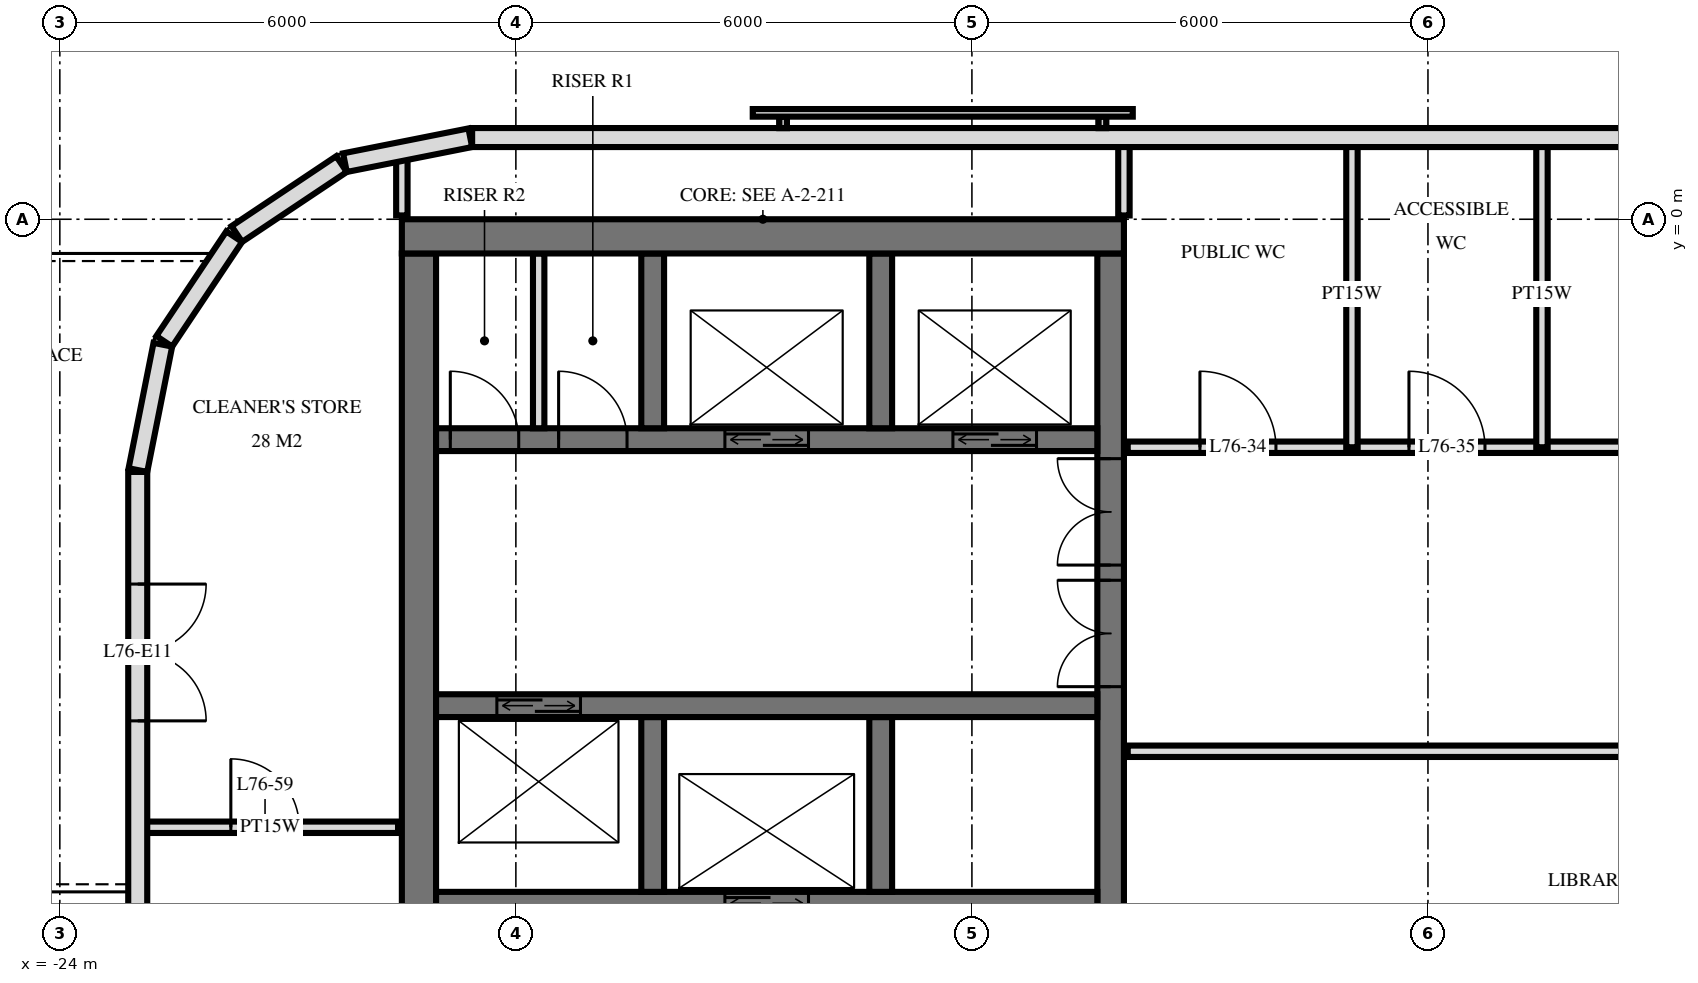
"""IFC4 building model, lengths in metres.
Left out: names, types, materials, properties, quantities, classifications, styles, units other than length and angle.
Written with IfcOpenShell. Run it as: python <this file> out.ifc"""

import sys

from ifc_helpers import new_model, si_unit, direction, frame, frame_2d, origin, place, context, subcontext, project, spatial, rectangle, extrude, element, fill, save


model = new_model("IFC4")
c1 = context("Model", 3, precision=1e-05, world=origin(), true_north=direction((0.0, 1.0)))
c2 = subcontext(c1, "Body", "Model", "MODEL_VIEW")
j1 = project(units=[si_unit("LENGTHUNIT", "METRE"), si_unit("PLANEANGLEUNIT", "RADIAN")], contexts=[c1])
p1 = place(None, origin())
s1 = spatial("IfcSite", under=j1, at=p1, CompositionType="ELEMENT")
p2 = place(p1, origin())
s2 = spatial("IfcBuilding", under=s1, at=p2, CompositionType="ELEMENT")
p3 = place(p2, frame((0.0, 0.0, 287.6)))
s3 = spatial("IfcBuildingStorey", under=s2, at=p3, CompositionType="ELEMENT", Elevation=287.6)
p4 = place(p3, frame((-19.5, -0.225, 0.0), z_axis=(0.0, 0.0, 1.0), x_axis=(1.0, 0.0, 0.0)))
e1 = element("IfcWall", 1, at=p4, inside=s3, PredefinedType="SHEAR", context=c2, shape_type="SweptSolid", body=[
    extrude(rectangle(XDim=9.5, YDim=0.45, at=frame_2d((4.75, 0.0))), origin(), (0.0, 0.0, 1.0), 3.5),
])
p5 = place(p3, frame((-10.175, -14.55, 0.0), z_axis=(0.0, 0.0, 1.0), x_axis=(0.0, 1.0, 0.0)))
e2 = element("IfcWall", 2, at=p5, inside=s3, PredefinedType="SHEAR", context=c2, shape_type="SweptSolid", body=[
    extrude(rectangle(XDim=14.1, YDim=0.35, at=frame_2d((7.05, 0.0))), origin(), (0.0, 0.0, 1.0), 3.5),
])
p6 = place(p5, frame((8.4, 0.0, 0.0)))
e3 = element("IfcOpeningElement", 3, at=p6, cuts=e2, PredefinedType="OPENING", context=c2, shape_type="SweptSolid", body=[
    extrude(rectangle(XDim=1.4, YDim=2.4, at=frame_2d((0.7, 1.2))), frame((0.0, 0.185, 0.0), z_axis=(0.0, -1.0, 0.0), x_axis=(1.0, 0.0, 0.0)), (0.0, 0.0, 1.0), 0.37),
])
p7 = place(p5, frame((10.0, 0.0, 0.0)))
e4 = element("IfcOpeningElement", 4, at=p7, cuts=e2, PredefinedType="OPENING", context=c2, shape_type="SweptSolid", body=[
    extrude(rectangle(XDim=1.4, YDim=2.4, at=frame_2d((0.7, 1.2))), frame((0.0, 0.185, 0.0), z_axis=(0.0, -1.0, 0.0), x_axis=(1.0, 0.0, 0.0)), (0.0, 0.0, 1.0), 0.37),
])
p8 = place(p5, frame((4.0, 0.0, 0.0)))
e5 = element("IfcOpeningElement", 5, at=p8, cuts=e2, PredefinedType="OPENING", context=c2, shape_type="SweptSolid", body=[
    extrude(rectangle(XDim=1.2, YDim=2.1, at=frame_2d((0.6, 1.05))), frame((0.0, 0.185, 0.0), z_axis=(0.0, -1.0, 0.0), x_axis=(1.0, 0.0, 0.0)), (0.0, 0.0, 1.0), 0.37),
])
p9 = place(p3, frame((-19.275, -14.55, 0.0), z_axis=(0.0, 0.0, 1.0), x_axis=(0.0, 1.0, 0.0)))
e6 = element("IfcWall", 6, at=p9, inside=s3, PredefinedType="SHEAR", context=c2, shape_type="SweptSolid", body=[
    extrude(rectangle(XDim=14.1, YDim=0.45, at=frame_2d((7.05, 0.0))), origin(), (0.0, 0.0, 1.0), 3.5),
])
p10 = place(p3, frame((-19.05, -2.9, 0.0), z_axis=(0.0, 0.0, 1.0), x_axis=(1.0, 0.0, 0.0)))
e7 = element("IfcWall", 7, at=p10, inside=s3, PredefinedType="SHEAR", context=c2, shape_type="SweptSolid", body=[
    extrude(rectangle(XDim=8.7, YDim=0.3, at=frame_2d((4.35, 0.0))), origin(), (0.0, 0.0, 1.0), 3.5),
])
p11 = place(p10, frame((6.8, 0.0, 0.0)))
e8 = element("IfcOpeningElement", 8, at=p11, cuts=e7, PredefinedType="OPENING", context=c2, shape_type="SweptSolid", body=[
    extrude(rectangle(XDim=1.1, YDim=2.1, at=frame_2d((0.55, 1.05))), frame((0.0, 0.16, 0.0), z_axis=(0.0, -1.0, 0.0), x_axis=(1.0, 0.0, 0.0)), (0.0, 0.0, 1.0), 0.32),
])
p12 = place(p10, frame((3.8, 0.0, 0.0)))
e9 = element("IfcOpeningElement", 9, at=p12, cuts=e7, PredefinedType="OPENING", context=c2, shape_type="SweptSolid", body=[
    extrude(rectangle(XDim=1.1, YDim=2.1, at=frame_2d((0.55, 1.05))), frame((0.0, 0.16, 0.0), z_axis=(0.0, -1.0, 0.0), x_axis=(1.0, 0.0, 0.0)), (0.0, 0.0, 1.0), 0.32),
])
p13 = place(p10, frame((1.613, 0.0, 0.0)))
e10 = element("IfcOpeningElement", 10, at=p13, cuts=e7, PredefinedType="OPENING", context=c2, shape_type="SweptSolid", body=[
    extrude(rectangle(XDim=0.9, YDim=2.1, at=frame_2d((0.45, 1.05))), frame((0.0, 0.16, 0.0), z_axis=(0.0, -1.0, 0.0), x_axis=(1.0, 0.0, 0.0)), (0.0, 0.0, 1.0), 0.32),
])
p14 = place(p10, frame((0.188, 0.0, 0.0)))
e11 = element("IfcOpeningElement", 11, at=p14, cuts=e7, PredefinedType="OPENING", context=c2, shape_type="SweptSolid", body=[
    extrude(rectangle(XDim=0.9, YDim=2.1, at=frame_2d((0.45, 1.05))), frame((0.0, 0.16, 0.0), z_axis=(0.0, -1.0, 0.0), x_axis=(1.0, 0.0, 0.0)), (0.0, 0.0, 1.0), 0.32),
])
p15 = place(p3, frame((-19.05, -6.4, 0.0), z_axis=(0.0, 0.0, 1.0), x_axis=(1.0, 0.0, 0.0)))
e12 = element("IfcWall", 12, at=p15, inside=s3, PredefinedType="SHEAR", context=c2, shape_type="SweptSolid", body=[
    extrude(rectangle(XDim=8.7, YDim=0.3, at=frame_2d((4.35, 0.0))), origin(), (0.0, 0.0, 1.0), 3.5),
])
p16 = place(p15, frame((0.8, 0.0, 0.0)))
e13 = element("IfcOpeningElement", 13, at=p16, cuts=e12, PredefinedType="OPENING", context=c2, shape_type="SweptSolid", body=[
    extrude(rectangle(XDim=1.1, YDim=2.1, at=frame_2d((0.55, 1.05))), frame((0.0, 0.16, 0.0), z_axis=(0.0, -1.0, 0.0), x_axis=(1.0, 0.0, 0.0)), (0.0, 0.0, 1.0), 0.32),
])
p17 = place(p3, frame((-19.05, -9.0, 0.0), z_axis=(0.0, 0.0, 1.0), x_axis=(1.0, 0.0, 0.0)))
e14 = element("IfcWall", 14, at=p17, inside=s3, PredefinedType="SHEAR", context=c2, shape_type="SweptSolid", body=[
    extrude(rectangle(XDim=8.7, YDim=0.3, at=frame_2d((4.35, 0.0))), origin(), (0.0, 0.0, 1.0), 3.5),
])
p18 = place(p17, frame((3.8, 0.0, 0.0)))
e15 = element("IfcOpeningElement", 15, at=p18, cuts=e14, PredefinedType="OPENING", context=c2, shape_type="SweptSolid", body=[
    extrude(rectangle(XDim=1.1, YDim=2.1, at=frame_2d((0.55, 1.05))), frame((0.0, 0.16, 0.0), z_axis=(0.0, -1.0, 0.0), x_axis=(1.0, 0.0, 0.0)), (0.0, 0.0, 1.0), 0.32),
])
for number, where, z_axis, x_axis in (
    (16, (-13.2, -2.75, 0.0), (0.0, 0.0, 1.0), (0.0, 1.0, 0.0)),
    (17, (-13.2, -8.85, 0.0), (0.0, 0.0, 1.0), (0.0, 1.0, 0.0)),
    (18, (-16.2, -2.75, 0.0), (0.0, 0.0, 1.0), (0.0, 1.0, 0.0)),
    (19, (-16.2, -8.85, 0.0), (0.0, 0.0, 1.0), (0.0, 1.0, 0.0)),
):
    element("IfcWall", number, at=place(p3, frame(where, z_axis=z_axis, x_axis=x_axis)), inside=s3, PredefinedType="SHEAR", context=c2, shape_type="SweptSolid", body=[
        extrude(rectangle(XDim=2.3, YDim=0.3, at=frame_2d((1.15, 0.0))), origin(), (0.0, 0.0, 1.0), 3.5),
    ])
p19 = place(p3, frame((18.575, 1.075, 0.0), z_axis=(0.0, 0.0, 1.0), x_axis=(-1.0, 0.0, 0.0)))
e20 = element("IfcWall", 20, at=p19, inside=s3, PredefinedType="SOLIDWALL", context=c2, shape_type="SweptSolid", body=[
    extrude(rectangle(XDim=37.151, YDim=0.25, at=frame_2d((18.575, 0.0))), origin(), (0.0, 0.0, 1.0), 3.22),
])
p20 = place(p19, frame((9.275, 0.0, 0.9)))
e21 = element("IfcOpeningElement", 21, at=p20, cuts=e20, PredefinedType="OPENING", context=c2, shape_type="SweptSolid", body=[
    extrude(rectangle(XDim=2.4, YDim=1.5, at=frame_2d((1.2, 0.75))), frame((0.0, 0.135, 0.0), z_axis=(0.0, -1.0, 0.0), x_axis=(1.0, 0.0, 0.0)), (0.0, 0.0, 1.0), 0.27),
])
p21 = place(p19, frame((12.275, 0.0, 0.9)))
e22 = element("IfcOpeningElement", 22, at=p21, cuts=e20, PredefinedType="OPENING", context=c2, shape_type="SweptSolid", body=[
    extrude(rectangle(XDim=2.4, YDim=1.5, at=frame_2d((1.2, 0.75))), frame((0.0, 0.135, 0.0), z_axis=(0.0, -1.0, 0.0), x_axis=(1.0, 0.0, 0.0)), (0.0, 0.0, 1.0), 0.27),
])
p22 = place(p19, frame((18.275, 0.0, 0.9)))
e23 = element("IfcOpeningElement", 23, at=p22, cuts=e20, PredefinedType="OPENING", context=c2, shape_type="SweptSolid", body=[
    extrude(rectangle(XDim=2.4, YDim=1.5, at=frame_2d((1.2, 0.75))), frame((0.0, 0.135, 0.0), z_axis=(0.0, -1.0, 0.0), x_axis=(1.0, 0.0, 0.0)), (0.0, 0.0, 1.0), 0.27),
])
p23 = place(p3, frame((-18.6, 1.073, 0.0), z_axis=(0.0, 0.0, 1.0), x_axis=(-0.980797896849, -0.195026884138, 0.0)))
e24 = element("IfcWall", 24, at=p23, inside=s3, PredefinedType="SOLIDWALL", context=c2, shape_type="SweptSolid", body=[
    extrude(rectangle(XDim=1.681, YDim=0.25, at=frame_2d((0.841, 0.0))), origin(), (0.0, 0.0, 1.0), 3.22),
])
for number, where, z_axis, x_axis in (
    (25, (-20.294, 0.726, 0.0), (0.0, 0.0, 1.0), (-0.831, -0.556, 0.0)),
    (26, (-21.706, -0.229, 0.0), (0.0, 0.0, 1.0), (-0.556, -0.831, 0.0)),
):
    element("IfcWall", number, at=place(p3, frame(where, z_axis=z_axis, x_axis=x_axis)), inside=s3, PredefinedType="SOLIDWALL", context=c2, shape_type="SweptSolid", body=[
        extrude(rectangle(XDim=1.656, YDim=0.25, at=frame_2d((0.828, 0.0))), origin(), (0.0, 0.0, 1.0), 3.22),
    ])
p24 = place(p3, frame((-22.645, -1.651, 0.0), z_axis=(0.0, 0.0, 1.0), x_axis=(-0.19513878023, -0.980775640221, 0.0)))
e27 = element("IfcWall", 27, at=p24, inside=s3, PredefinedType="SOLIDWALL", context=c2, shape_type="SweptSolid", body=[
    extrude(rectangle(XDim=1.681, YDim=0.25, at=frame_2d((0.841, 0.0))), origin(), (0.0, 0.0, 1.0), 3.22),
])
p25 = place(p3, frame((-22.975, -3.325, 0.0), z_axis=(0.0, 0.0, 1.0), x_axis=(0.0, -1.0, 0.0)))
e28 = element("IfcWall", 28, at=p25, inside=s3, PredefinedType="SOLIDWALL", context=c2, shape_type="SweptSolid", body=[
    extrude(rectangle(XDim=25.951, YDim=0.25, at=frame_2d((12.975, 0.0))), origin(), (0.0, 0.0, 1.0), 3.22),
])
p26 = place(p25, frame((1.475, 0.0, 0.0)))
e29 = element("IfcOpeningElement", 29, at=p26, cuts=e28, PredefinedType="OPENING", context=c2, shape_type="SweptSolid", body=[
    extrude(rectangle(XDim=1.8, YDim=2.4, at=frame_2d((0.9, 1.2))), frame((0.0, 0.135, 0.0), z_axis=(0.0, -1.0, 0.0), x_axis=(1.0, 0.0, 0.0)), (0.0, 0.0, 1.0), 0.27),
])
p27 = place(p25, frame((7.975, 0.0, 0.0)))
e30 = element("IfcOpeningElement", 30, at=p27, cuts=e28, PredefinedType="OPENING", context=c2, shape_type="SweptSolid", body=[
    extrude(rectangle(XDim=1.8, YDim=2.4, at=frame_2d((0.9, 1.2))), frame((0.0, 0.135, 0.0), z_axis=(0.0, -1.0, 0.0), x_axis=(1.0, 0.0, 0.0)), (0.0, 0.0, 1.0), 0.27),
])
p28 = place(p25, frame((18.175, 0.0, 0.0)))
e31 = element("IfcOpeningElement", 31, at=p28, cuts=e28, PredefinedType="OPENING", context=c2, shape_type="SweptSolid", body=[
    extrude(rectangle(XDim=1.8, YDim=2.4, at=frame_2d((0.9, 1.2))), frame((0.0, 0.135, 0.0), z_axis=(0.0, -1.0, 0.0), x_axis=(1.0, 0.0, 0.0)), (0.0, 0.0, 1.0), 0.27),
])
p29 = place(p25, frame((21.075, 0.0, 0.0)))
e32 = element("IfcOpeningElement", 32, at=p29, cuts=e28, PredefinedType="OPENING", context=c2, shape_type="SweptSolid", body=[
    extrude(rectangle(XDim=1.8, YDim=2.4, at=frame_2d((0.9, 1.2))), frame((0.0, 0.135, 0.0), z_axis=(0.0, -1.0, 0.0), x_axis=(1.0, 0.0, 0.0)), (0.0, 0.0, 1.0), 0.27),
])
p30 = place(p25, frame((23.825, 0.0, 0.9)))
e33 = element("IfcOpeningElement", 33, at=p30, cuts=e28, PredefinedType="OPENING", context=c2, shape_type="SweptSolid", body=[
    extrude(rectangle(XDim=1.8, YDim=1.5, at=frame_2d((0.9, 0.75))), frame((0.0, 0.135, 0.0), z_axis=(0.0, -1.0, 0.0), x_axis=(1.0, 0.0, 0.0)), (0.0, 0.0, 1.0), 0.27),
])
p31 = place(p3, frame((-17.7, -2.75, 0.0), z_axis=(0.0, 0.0, 1.0), x_axis=(0.0, 1.0, 0.0)))
e34 = element("IfcWall", 34, at=p31, inside=s3, PredefinedType="PARTITIONING", context=c2, shape_type="SweptSolid", body=[
    extrude(rectangle(XDim=2.3, YDim=0.15, at=frame_2d((1.15, 0.0))), origin(), (0.0, 0.0, 1.0), 3.2),
])
for number, where, z_axis, x_axis in (
    (35, (-4.5, -3.0, 0.0), (0.0, 0.0, 1.0), (0.0, 1.0, 0.0)),
    (36, (-7.0, -3.0, 0.0), (0.0, 0.0, 1.0), (0.0, 1.0, 0.0)),
):
    element("IfcWall", number, at=place(p3, frame(where, z_axis=z_axis, x_axis=x_axis)), inside=s3, PredefinedType="PLUMBINGWALL", context=c2, shape_type="SweptSolid", body=[
        extrude(rectangle(XDim=4.02, YDim=0.15, at=frame_2d((2.01, 0.0))), origin(), (0.0, 0.0, 1.0), 3.22),
    ])
p32 = place(p3, frame((-10.0, 0.05, 0.0), z_axis=(0.0, 0.0, 1.0), x_axis=(0.0, 1.0, 0.0)))
e37 = element("IfcWall", 37, at=p32, inside=s3, PredefinedType="PLUMBINGWALL", context=c2, shape_type="SweptSolid", body=[
    extrude(rectangle(XDim=0.97, YDim=0.15, at=frame_2d((0.485, 0.0))), origin(), (0.0, 0.0, 1.0), 3.22),
])
p33 = place(p3, frame((-19.5, 0.05, 0.0), z_axis=(0.0, 0.0, 1.0), x_axis=(0.0, 1.0, 0.0)))
e38 = element("IfcWall", 38, at=p33, inside=s3, PredefinedType="PARTITIONING", context=c2, shape_type="SweptSolid", body=[
    extrude(rectangle(XDim=0.787, YDim=0.15, at=frame_2d((0.394, 0.0))), origin(), (0.0, 0.0, 1.0), 3.22),
])
p34 = place(p3, frame((-22.92, -8.0, 0.0), z_axis=(0.0, 0.0, 1.0), x_axis=(1.0, 0.0, 0.0)))
e39 = element("IfcWall", 39, at=p34, inside=s3, PredefinedType="PLUMBINGWALL", context=c2, shape_type="SweptSolid", body=[
    extrude(rectangle(XDim=3.37, YDim=0.15, at=frame_2d((1.685, 0.0))), origin(), (0.0, 0.0, 1.0), 3.22),
])
p35 = place(p34, frame((1.17, 0.0, 0.0)))
e40 = element("IfcOpeningElement", 40, at=p35, cuts=e39, PredefinedType="OPENING", context=c2, shape_type="SweptSolid", body=[
    extrude(rectangle(XDim=0.9, YDim=2.1, at=frame_2d((0.45, 1.05))), frame((0.0, 0.085, 0.0), z_axis=(0.0, -1.0, 0.0), x_axis=(1.0, 0.0, 0.0)), (0.0, 0.0, 1.0), 0.17),
])
p36 = place(p3, frame((-9.95, -7.0, 0.0), z_axis=(0.0, 0.0, 1.0), x_axis=(1.0, 0.0, 0.0)))
e41 = element("IfcWall", 41, at=p36, inside=s3, PredefinedType="PARTITIONING", context=c2, shape_type="SweptSolid", body=[
    extrude(rectangle(XDim=19.9, YDim=0.15, at=frame_2d((9.95, 0.0))), origin(), (0.0, 0.0, 1.0), 3.22),
])
p37 = place(p36, frame((9.45, 0.0, 0.0)))
e42 = element("IfcOpeningElement", 42, at=p37, cuts=e41, PredefinedType="OPENING", context=c2, shape_type="SweptSolid", body=[
    extrude(rectangle(XDim=1.0, YDim=2.1, at=frame_2d((0.5, 1.05))), frame((0.0, 0.085, 0.0), z_axis=(0.0, -1.0, 0.0), x_axis=(1.0, 0.0, 0.0)), (0.0, 0.0, 1.0), 0.17),
])
p38 = place(p36, frame((15.45, 0.0, 0.0)))
e43 = element("IfcOpeningElement", 43, at=p38, cuts=e41, PredefinedType="OPENING", context=c2, shape_type="SweptSolid", body=[
    extrude(rectangle(XDim=1.0, YDim=2.1, at=frame_2d((0.5, 1.05))), frame((0.0, 0.085, 0.0), z_axis=(0.0, -1.0, 0.0), x_axis=(1.0, 0.0, 0.0)), (0.0, 0.0, 1.0), 0.17),
])
p39 = place(p3, frame((-9.95, -3.0, 0.0), z_axis=(0.0, 0.0, 1.0), x_axis=(1.0, 0.0, 0.0)))
e44 = element("IfcWall", 44, at=p39, inside=s3, PredefinedType="PARTITIONING", context=c2, shape_type="SweptSolid", body=[
    extrude(rectangle(XDim=19.9, YDim=0.15, at=frame_2d((9.95, 0.0))), origin(), (0.0, 0.0, 1.0), 3.22),
])
p40 = place(p39, frame((0.95, 0.0, 0.0)))
e45 = element("IfcOpeningElement", 45, at=p40, cuts=e44, PredefinedType="OPENING", context=c2, shape_type="SweptSolid", body=[
    extrude(rectangle(XDim=1.0, YDim=2.1, at=frame_2d((0.5, 1.05))), frame((0.0, 0.085, 0.0), z_axis=(0.0, -1.0, 0.0), x_axis=(1.0, 0.0, 0.0)), (0.0, 0.0, 1.0), 0.17),
])
p41 = place(p39, frame((3.7, 0.0, 0.0)))
e46 = element("IfcOpeningElement", 46, at=p41, cuts=e44, PredefinedType="OPENING", context=c2, shape_type="SweptSolid", body=[
    extrude(rectangle(XDim=1.0, YDim=2.1, at=frame_2d((0.5, 1.05))), frame((0.0, 0.085, 0.0), z_axis=(0.0, -1.0, 0.0), x_axis=(1.0, 0.0, 0.0)), (0.0, 0.0, 1.0), 0.17),
])
p42 = place(p39, frame((7.95, 0.0, 0.0)))
e47 = element("IfcOpeningElement", 47, at=p42, cuts=e44, PredefinedType="OPENING", context=c2, shape_type="SweptSolid", body=[
    extrude(rectangle(XDim=1.0, YDim=2.1, at=frame_2d((0.5, 1.05))), frame((0.0, 0.085, 0.0), z_axis=(0.0, -1.0, 0.0), x_axis=(1.0, 0.0, 0.0)), (0.0, 0.0, 1.0), 0.17),
])
p43 = place(p39, frame((15.2, 0.0, 0.0)))
e48 = element("IfcOpeningElement", 48, at=p43, cuts=e44, PredefinedType="OPENING", context=c2, shape_type="SweptSolid", body=[
    extrude(rectangle(XDim=1.0, YDim=2.1, at=frame_2d((0.5, 1.05))), frame((0.0, 0.085, 0.0), z_axis=(0.0, -1.0, 0.0), x_axis=(1.0, 0.0, 0.0)), (0.0, 0.0, 1.0), 0.17),
])
p44 = place(p26, origin())
e49 = element("IfcDoor", 49, at=p44, inside=s3, OperationType="DOUBLE_DOOR_SINGLE_SWING", PredefinedType="DOOR", context=c2, shape_type="SweptSolid", body=[
    extrude(rectangle(XDim=1.8, YDim=2.4, at=frame_2d((0.9, 1.2))), frame((0.0, 0.025, 0.0), z_axis=(0.0, -1.0, 0.0), x_axis=(1.0, 0.0, 0.0)), (0.0, 0.0, 1.0), 0.05),
])
fill(e29, e49)
p45 = place(p11, origin())
e50 = element("IfcDoor", 50, at=p45, inside=s3, OperationType="DOUBLE_DOOR_SLIDING", PredefinedType="USERDEFINED", context=c2, shape_type="SweptSolid", body=[
    extrude(rectangle(XDim=1.1, YDim=2.1, at=frame_2d((0.55, 1.05))), frame((0.0, 0.025, 0.0), z_axis=(0.0, -1.0, 0.0), x_axis=(1.0, 0.0, 0.0)), (0.0, 0.0, 1.0), 0.05),
])
fill(e8, e50)
p46 = place(p12, origin())
e51 = element("IfcDoor", 51, at=p46, inside=s3, OperationType="DOUBLE_DOOR_SLIDING", PredefinedType="USERDEFINED", context=c2, shape_type="SweptSolid", body=[
    extrude(rectangle(XDim=1.1, YDim=2.1, at=frame_2d((0.55, 1.05))), frame((0.0, 0.025, 0.0), z_axis=(0.0, -1.0, 0.0), x_axis=(1.0, 0.0, 0.0)), (0.0, 0.0, 1.0), 0.05),
])
fill(e9, e51)
p47 = place(p18, origin())
e52 = element("IfcDoor", 52, at=p47, inside=s3, OperationType="DOUBLE_DOOR_SLIDING", PredefinedType="USERDEFINED", context=c2, shape_type="SweptSolid", body=[
    extrude(rectangle(XDim=1.1, YDim=2.1, at=frame_2d((0.55, 1.05))), frame((0.0, 0.025, 0.0), z_axis=(0.0, -1.0, 0.0), x_axis=(1.0, 0.0, 0.0)), (0.0, 0.0, 1.0), 0.05),
])
fill(e15, e52)
p48 = place(p16, origin())
e53 = element("IfcDoor", 53, at=p48, inside=s3, OperationType="DOUBLE_DOOR_SLIDING", PredefinedType="USERDEFINED", context=c2, shape_type="SweptSolid", body=[
    extrude(rectangle(XDim=1.1, YDim=2.1, at=frame_2d((0.55, 1.05))), frame((0.0, 0.025, 0.0), z_axis=(0.0, -1.0, 0.0), x_axis=(1.0, 0.0, 0.0)), (0.0, 0.0, 1.0), 0.05),
])
fill(e13, e53)
p49 = place(p6, origin())
e54 = element("IfcDoor", 54, at=p49, inside=s3, OperationType="DOUBLE_DOOR_SINGLE_SWING", PredefinedType="DOOR", context=c2, shape_type="SweptSolid", body=[
    extrude(rectangle(XDim=1.4, YDim=2.4, at=frame_2d((0.7, 1.2))), frame((0.0, 0.025, 0.0), z_axis=(0.0, -1.0, 0.0), x_axis=(1.0, 0.0, 0.0)), (0.0, 0.0, 1.0), 0.05),
])
fill(e3, e54)
p50 = place(p7, origin())
e55 = element("IfcDoor", 55, at=p50, inside=s3, OperationType="DOUBLE_DOOR_SINGLE_SWING", PredefinedType="DOOR", context=c2, shape_type="SweptSolid", body=[
    extrude(rectangle(XDim=1.4, YDim=2.4, at=frame_2d((0.7, 1.2))), frame((0.0, 0.025, 0.0), z_axis=(0.0, -1.0, 0.0), x_axis=(1.0, 0.0, 0.0)), (0.0, 0.0, 1.0), 0.05),
])
fill(e4, e55)
p51 = place(p13, origin())
e56 = element("IfcDoor", 56, at=p51, inside=s3, OperationType="SINGLE_SWING_RIGHT", PredefinedType="DOOR", context=c2, shape_type="SweptSolid", body=[
    extrude(rectangle(XDim=0.9, YDim=2.1, at=frame_2d((0.45, 1.05))), frame((0.0, 0.025, 0.0), z_axis=(0.0, -1.0, 0.0), x_axis=(1.0, 0.0, 0.0)), (0.0, 0.0, 1.0), 0.05),
])
fill(e10, e56)
p52 = place(p14, origin())
e57 = element("IfcDoor", 57, at=p52, inside=s3, OperationType="SINGLE_SWING_RIGHT", PredefinedType="DOOR", context=c2, shape_type="SweptSolid", body=[
    extrude(rectangle(XDim=0.9, YDim=2.1, at=frame_2d((0.45, 1.05))), frame((0.0, 0.025, 0.0), z_axis=(0.0, -1.0, 0.0), x_axis=(1.0, 0.0, 0.0)), (0.0, 0.0, 1.0), 0.05),
])
fill(e11, e57)
p53 = place(p40, origin())
e58 = element("IfcDoor", 58, at=p53, inside=s3, OperationType="SINGLE_SWING_RIGHT", PredefinedType="DOOR", context=c2, shape_type="SweptSolid", body=[
    extrude(rectangle(XDim=1.0, YDim=2.1, at=frame_2d((0.5, 1.05))), frame((0.0, 0.025, 0.0), z_axis=(0.0, -1.0, 0.0), x_axis=(1.0, 0.0, 0.0)), (0.0, 0.0, 1.0), 0.05),
])
fill(e45, e58)
p54 = place(p41, origin())
e59 = element("IfcDoor", 59, at=p54, inside=s3, OperationType="SINGLE_SWING_RIGHT", PredefinedType="DOOR", context=c2, shape_type="SweptSolid", body=[
    extrude(rectangle(XDim=1.0, YDim=2.1, at=frame_2d((0.5, 1.05))), frame((0.0, 0.025, 0.0), z_axis=(0.0, -1.0, 0.0), x_axis=(1.0, 0.0, 0.0)), (0.0, 0.0, 1.0), 0.05),
])
fill(e46, e59)
p55 = place(p35, origin())
e60 = element("IfcDoor", 60, at=p55, inside=s3, OperationType="SINGLE_SWING_RIGHT", PredefinedType="DOOR", context=c2, shape_type="SweptSolid", body=[
    extrude(rectangle(XDim=0.9, YDim=2.1, at=frame_2d((0.45, 1.05))), frame((0.0, 0.025, 0.0), z_axis=(0.0, -1.0, 0.0), x_axis=(1.0, 0.0, 0.0)), (0.0, 0.0, 1.0), 0.05),
])
fill(e40, e60)
save(model, sys.argv[1])
